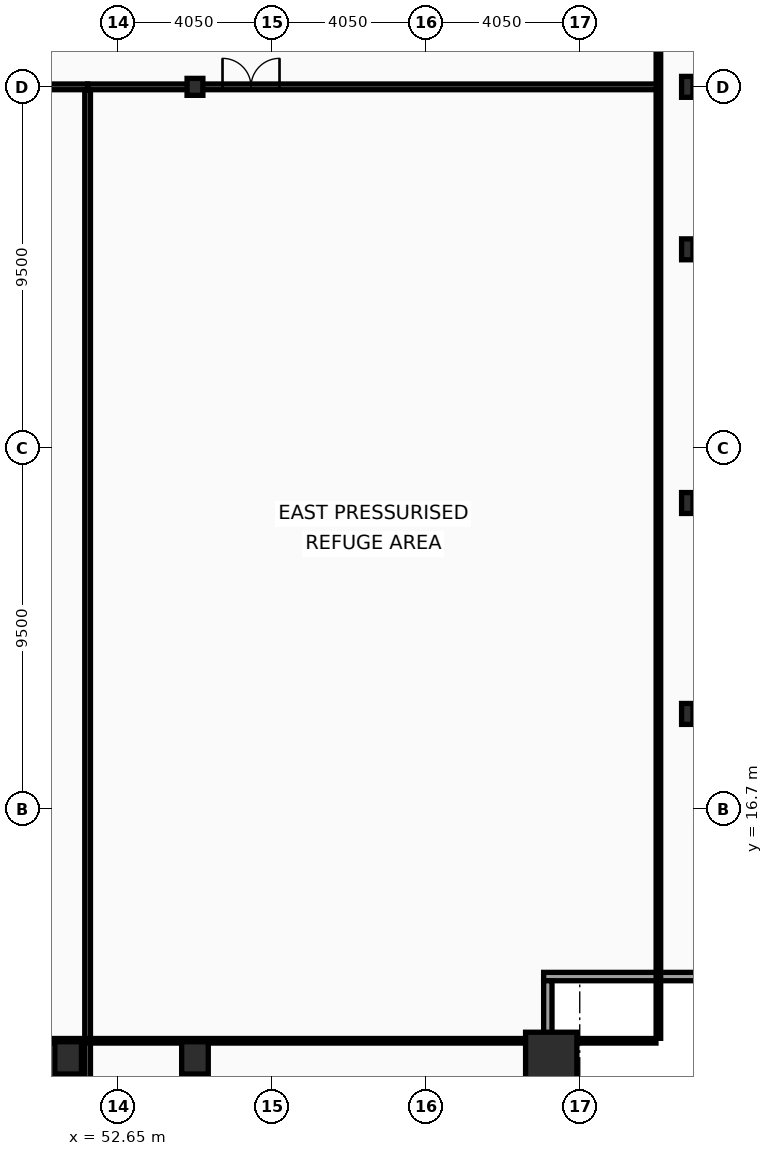
"""IFC4 building model, lengths in metres.
Left out: names, types, materials, properties, quantities, classifications, styles, units other than length and angle.
Written with IfcOpenShell. Run it as: python <this file> out.ifc"""

import sys

from ifc_helpers import new_model, si_unit, direction, frame, frame_2d, origin, origin_2d, place, context, subcontext, project, spatial, rectangle, hollow_rectangle, i_section, extrude, element, fill, save


model = new_model("IFC4")
c1 = context("Model", 3, precision=1e-05, world=origin(), true_north=direction((0.0, 1.0)))
c2 = subcontext(c1, "Body", "Model", "MODEL_VIEW")
j1 = project(units=[si_unit("LENGTHUNIT", "METRE"), si_unit("PLANEANGLEUNIT", "RADIAN")], contexts=[c1])
p1 = place(None, origin())
s1 = spatial("IfcSite", under=j1, at=p1, CompositionType="ELEMENT")
p2 = place(p1, origin())
s2 = spatial("IfcBuilding", under=s1, at=p2, CompositionType="ELEMENT")
p3 = place(p2, frame((0.0, 0.0, 172.2)))
s3 = spatial("IfcBuildingStorey", under=s2, at=p3, CompositionType="ELEMENT", Elevation=172.2)
p4 = place(p3, frame((64.05, 10.15, 0.0), z_axis=(0.0, 0.0, 1.0), x_axis=(1.0, 0.0, 0.0)))
e1 = element("IfcColumn", 1, at=p4, inside=s3, PredefinedType="COLUMN", context=c2, shape_type="SweptSolid", body=[
    extrude(hollow_rectangle(XDim=1.35, YDim=1.35, WallThickness=0.065, at=origin_2d()), origin(), (0.0, 0.0, 1.0), 4.8),
])
for number, where, z_axis, x_axis in (
    (2, (51.337, 10.15, 0.0), (0.0, 0.0, 1.0), (1.0, 0.0, 0.0)),
    (3, (54.675, 10.15, 0.0), (0.0, 0.0, 1.0), (1.0, 0.0, 0.0)),
):
    element("IfcColumn", number, at=place(p3, frame(where, z_axis=z_axis, x_axis=x_axis)), inside=s3, PredefinedType="COLUMN", context=c2, shape_type="SweptSolid", body=[
        extrude(hollow_rectangle(XDim=0.7, YDim=0.85, WallThickness=0.05, at=origin_2d()), origin(), (0.0, 0.0, 1.0), 4.8),
    ])
for number, where, z_axis, x_axis in (
    (4, (67.63, 19.2, 0.0), (0.0, 0.0, 1.0), (1.0, 0.0, 0.0)),
    (5, (67.63, 24.75, 0.0), (0.0, 0.0, 1.0), (1.0, 0.0, 0.0)),
    (6, (67.63, 31.425, 0.0), (0.0, 0.0, 1.0), (1.0, 0.0, 0.0)),
    (7, (67.63, 35.7, 0.0), (0.0, 0.0, 1.0), (1.0, 0.0, 0.0)),
):
    element("IfcColumn", number, at=place(p3, frame(where, z_axis=z_axis, x_axis=x_axis)), inside=s3, PredefinedType="COLUMN", context=c2, shape_type="SweptSolid", body=[
        extrude(i_section(OverallWidth=0.3, OverallDepth=0.55, WebThickness=0.015, FlangeThickness=0.029, at=origin_2d()), origin(), (0.0, 0.0, 1.0), 4.8),
    ])
p5 = place(p3, frame((54.675, 35.7, 0.0), z_axis=(0.0, 0.0, 1.0), x_axis=(1.0, 0.0, 0.0)))
e8 = element("IfcColumn", 8, at=p5, inside=s3, PredefinedType="COLUMN", context=c2, shape_type="SweptSolid", body=[
    extrude(i_section(OverallWidth=0.416, OverallDepth=0.446, WebThickness=0.039, FlangeThickness=0.063, at=origin_2d()), origin(), (0.0, 0.0, 1.0), 4.8),
])
p6 = place(p3, frame((68.07, 12.29, 0.0), z_axis=(0.0, 0.0, 1.0), x_axis=(-1.0, 0.0, 0.0)))
e9 = element("IfcWall", 9, at=p6, inside=s3, PredefinedType="SOLIDWALL", context=c2, shape_type="SweptSolid", body=[
    extrude(rectangle(XDim=4.22, YDim=0.22, at=frame_2d((2.11, 0.0))), origin(), (0.0, 0.0, 1.0), 4.03),
])
p7 = place(p3, frame((63.96, 12.18, 0.0), z_axis=(0.0, 0.0, 1.0), x_axis=(0.0, -1.0, 0.0)))
e10 = element("IfcWall", 10, at=p7, inside=s3, PredefinedType="SOLIDWALL", context=c2, shape_type="SweptSolid", body=[
    extrude(rectangle(XDim=3.91, YDim=0.22, at=frame_2d((1.955, 0.0))), origin(), (0.0, 0.0, 1.0), 4.03),
])
p8 = place(p3, frame((47.45, 35.7, 0.0), z_axis=(0.0, 0.0, 1.0), x_axis=(1.0, 0.0, 0.0)))
e11 = element("IfcWall", 11, at=p8, inside=s3, PredefinedType="PARTITIONING", context=c2, shape_type="SweptSolid", body=[
    extrude(rectangle(XDim=4.4, YDim=0.15, at=frame_2d((2.2, 0.0))), origin(), (0.0, 0.0, 1.0), 3.93),
])
p9 = place(p3, frame((51.85, 35.7, 0.0), z_axis=(0.0, 0.0, 1.0), x_axis=(1.0, 0.0, 0.0)))
e12 = element("IfcWall", 12, at=p9, inside=s3, PredefinedType="PARTITIONING", context=c2, shape_type="SweptSolid", body=[
    extrude(rectangle(XDim=15.02, YDim=0.15, at=frame_2d((7.51, 0.0))), origin(), (0.0, 0.0, 1.0), 3.93),
])
p10 = place(p9, frame((3.55, 0.0, 0.0)))
e13 = element("IfcOpeningElement", 13, at=p10, cuts=e12, PredefinedType="OPENING", context=c2, shape_type="SweptSolid", body=[
    extrude(rectangle(XDim=1.5, YDim=2.15, at=frame_2d((0.75, 1.075))), frame((0.0, 0.085, 0.0), z_axis=(0.0, -1.0, 0.0), x_axis=(1.0, 0.0, 0.0)), (0.0, 0.0, 1.0), 0.17),
])
p11 = place(p3, frame((51.85, 8.32, 0.0), z_axis=(0.0, 0.0, 1.0), x_axis=(0.0, 1.0, 0.0)))
e14 = element("IfcWall", 14, at=p11, inside=s3, PredefinedType="PARTITIONING", context=c2, shape_type="SweptSolid", body=[
    extrude(rectangle(XDim=27.3, YDim=0.15, at=frame_2d((13.65, 0.0))), origin(), (0.0, 0.0, 1.0), 3.83),
])
p12 = place(p3, frame((66.87, 10.665, 0.0), z_axis=(0.0, 0.0, 1.0), x_axis=(0.0, 1.0, 0.0)))
e15 = element("IfcWall", 15, at=p12, inside=s3, PredefinedType="PARTITIONING", context=c2, shape_type="SweptSolid", body=[
    extrude(rectangle(XDim=42.11, YDim=0.12, at=frame_2d((21.055, 0.0))), origin(), (0.0, 0.0, 1.0), 3.93),
])
p13 = place(p3, frame((6.095, 10.6, 0.0), z_axis=(0.0, 0.0, 1.0), x_axis=(1.0, 0.0, 0.0)))
e16 = element("IfcWall", 16, at=p13, inside=s3, PredefinedType="PARTITIONING", context=c2, shape_type="SweptSolid", body=[
    extrude(rectangle(XDim=60.71, YDim=0.12, at=frame_2d((30.355, 0.0))), origin(), (0.0, 0.0, 1.0), 3.93),
])
p14 = place(p10, origin())
e17 = element("IfcDoor", 17, at=p14, inside=s3, OperationType="DOUBLE_DOOR_SINGLE_SWING", PredefinedType="DOOR", context=c2, shape_type="SweptSolid", body=[
    extrude(rectangle(XDim=1.5, YDim=2.15, at=frame_2d((0.75, 1.075))), frame((0.0, 0.025, 0.0), z_axis=(0.0, -1.0, 0.0), x_axis=(1.0, 0.0, 0.0)), (0.0, 0.0, 1.0), 0.05),
])
fill(e13, e17)
save(model, sys.argv[1])
